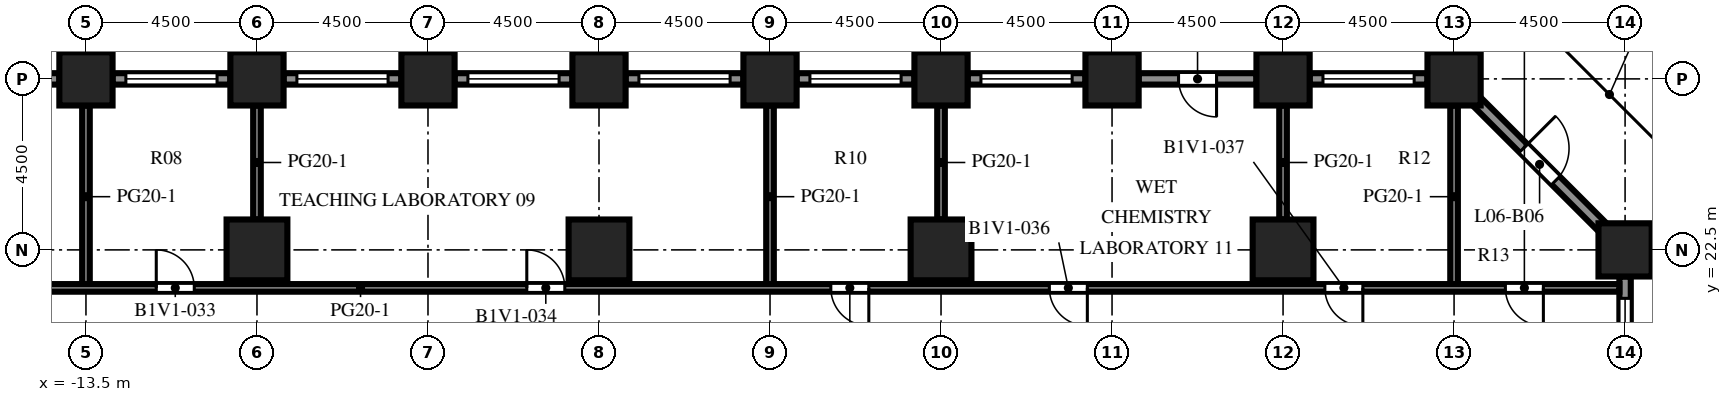
"""IFC4 building model, lengths in metres.
Left out: names, types, materials, properties, quantities, classifications, styles, units other than length and angle.
Written with IfcOpenShell. Run it as: python <this file> out.ifc"""

import sys

from ifc_helpers import new_model, si_unit, direction, frame, frame_2d, origin, origin_2d, place, context, subcontext, project, spatial, rectangle, extrude, element, fill, save


model = new_model("IFC4")
c1 = context("Model", 3, precision=1e-05, world=origin(), true_north=direction((0.0, 1.0)))
c2 = subcontext(c1, "Body", "Model", "MODEL_VIEW")
j1 = project(units=[si_unit("LENGTHUNIT", "METRE"), si_unit("PLANEANGLEUNIT", "RADIAN")], contexts=[c1])
p1 = place(None, origin())
s1 = spatial("IfcSite", under=j1, at=p1, CompositionType="ELEMENT")
p2 = place(p1, origin())
s2 = spatial("IfcBuilding", under=s1, at=p2, CompositionType="ELEMENT")
p3 = place(p2, frame((0.0, 0.0, 27.7)))
s3 = spatial("IfcBuildingStorey", under=s2, at=p3, CompositionType="ELEMENT", Elevation=27.7)
for number, where, z_axis, x_axis in (
    (1, (-13.5, 27.0, 0.0), (0.0, 0.0, 1.0), (1.0, 0.0, 0.0)),
    (2, (-9.0, 27.0, 0.0), (0.0, 0.0, 1.0), (1.0, 0.0, 0.0)),
    (3, (-4.5, 27.0, 0.0), (0.0, 0.0, 1.0), (1.0, 0.0, 0.0)),
    (4, (0.0, 27.0, 0.0), (0.0, 0.0, 1.0), (1.0, 0.0, 0.0)),
    (5, (4.5, 27.0, 0.0), (0.0, 0.0, 1.0), (1.0, 0.0, 0.0)),
    (6, (9.0, 27.0, 0.0), (0.0, 0.0, 1.0), (1.0, 0.0, 0.0)),
    (7, (13.5, 27.0, 0.0), (0.0, 0.0, 1.0), (1.0, 0.0, 0.0)),
    (8, (18.0, 27.0, 0.0), (0.0, 0.0, 1.0), (1.0, 0.0, 0.0)),
    (9, (22.5, 27.0, 0.0), (0.0, 0.0, 1.0), (1.0, 0.0, 0.0)),
    (10, (27.0, 22.5, 0.0), (0.0, 0.0, 1.0), (1.0, 0.0, 0.0)),
):
    element("IfcColumn", number, at=place(p3, frame(where, z_axis=z_axis, x_axis=x_axis)), inside=s3, PredefinedType="COLUMN", context=c2, shape_type="SweptSolid", body=[
        extrude(rectangle(XDim=1.4, YDim=1.4, at=origin_2d()), origin(), (0.0, 0.0, 1.0), 4.1),
    ])
for number, where, z_axis, x_axis in (
    (11, (-9.0, 22.5, 0.0), (0.0, 0.0, 1.0), (1.0, 0.0, 0.0)),
    (12, (0.0, 22.5, 0.0), (0.0, 0.0, 1.0), (1.0, 0.0, 0.0)),
    (13, (9.0, 22.5, 0.0), (0.0, 0.0, 1.0), (1.0, 0.0, 0.0)),
    (14, (18.0, 22.5, 0.0), (0.0, 0.0, 1.0), (1.0, 0.0, 0.0)),
):
    element("IfcColumn", number, at=place(p3, frame(where, z_axis=z_axis, x_axis=x_axis)), inside=s3, PredefinedType="COLUMN", context=c2, shape_type="SweptSolid", body=[
        extrude(rectangle(XDim=1.6, YDim=1.6, at=origin_2d()), origin(), (0.0, 0.0, 1.0), 4.1),
    ])
p4 = place(p3, frame((27.0, 21.8, 0.0), z_axis=(0.0, 0.0, 1.0), x_axis=(0.0, -1.0, 0.0)))
e15 = element("IfcWall", 15, at=p4, inside=s3, PredefinedType="SOLIDWALL", context=c2, shape_type="SweptSolid", body=[
    extrude(rectangle(XDim=3.1, YDim=0.3, at=frame_2d((1.55, 0.0))), origin(), (0.0, 0.0, 1.0), 2.75),
])
p5 = place(p4, frame((0.575, 0.0, 0.8)))
e16 = element("IfcOpeningElement", 16, at=p5, cuts=e15, PredefinedType="OPENING", context=c2, shape_type="SweptSolid", body=[
    extrude(rectangle(XDim=2.4, YDim=1.7, at=frame_2d((1.2, 0.85))), frame((0.0, 0.16, 0.0), z_axis=(0.0, -1.0, 0.0), x_axis=(1.0, 0.0, 0.0)), (0.0, 0.0, 1.0), 0.32),
])
p6 = place(p3, frame((23.094, 26.406, 0.0), z_axis=(0.0, 0.0, 1.0), x_axis=(0.707106781187, -0.707106781187, 0.0)))
e17 = element("IfcWall", 17, at=p6, inside=s3, PredefinedType="SOLIDWALL", context=c2, shape_type="SweptSolid", body=[
    extrude(rectangle(XDim=4.684, YDim=0.3, at=frame_2d((2.342, 0.0))), origin(), (0.0, 0.0, 1.0), 2.75),
])
p7 = place(p6, frame((1.742, 0.0, 0.0)))
e18 = element("IfcOpeningElement", 18, at=p7, cuts=e17, PredefinedType="OPENING", context=c2, shape_type="SweptSolid", body=[
    extrude(rectangle(XDim=1.2, YDim=2.2, at=frame_2d((0.6, 1.1))), frame((0.0, 0.16, 0.0), z_axis=(0.0, -1.0, 0.0), x_axis=(1.0, 0.0, 0.0)), (0.0, 0.0, 1.0), 0.32),
])
p8 = place(p3, frame((18.7, 27.0, 0.0), z_axis=(0.0, 0.0, 1.0), x_axis=(1.0, 0.0, 0.0)))
e19 = element("IfcWall", 19, at=p8, inside=s3, PredefinedType="SOLIDWALL", context=c2, shape_type="SweptSolid", body=[
    extrude(rectangle(XDim=3.1, YDim=0.3, at=frame_2d((1.55, 0.0))), origin(), (0.0, 0.0, 1.0), 2.75),
])
p9 = place(p8, frame((0.35, 0.0, 0.8)))
e20 = element("IfcOpeningElement", 20, at=p9, cuts=e19, PredefinedType="OPENING", context=c2, shape_type="SweptSolid", body=[
    extrude(rectangle(XDim=2.4, YDim=1.7, at=frame_2d((1.2, 0.85))), frame((0.0, 0.16, 0.0), z_axis=(0.0, -1.0, 0.0), x_axis=(1.0, 0.0, 0.0)), (0.0, 0.0, 1.0), 0.32),
])
p10 = place(p3, frame((14.2, 27.0, 0.0), z_axis=(0.0, 0.0, 1.0), x_axis=(1.0, 0.0, 0.0)))
e21 = element("IfcWall", 21, at=p10, inside=s3, PredefinedType="SOLIDWALL", context=c2, shape_type="SweptSolid", body=[
    extrude(rectangle(XDim=3.1, YDim=0.3, at=frame_2d((1.55, 0.0))), origin(), (0.0, 0.0, 1.0), 2.75),
])
p11 = place(p10, frame((1.05, 0.0, 0.0)))
e22 = element("IfcOpeningElement", 22, at=p11, cuts=e21, PredefinedType="OPENING", context=c2, shape_type="SweptSolid", body=[
    extrude(rectangle(XDim=1.0, YDim=2.2, at=frame_2d((0.5, 1.1))), frame((0.0, 0.16, 0.0), z_axis=(0.0, -1.0, 0.0), x_axis=(1.0, 0.0, 0.0)), (0.0, 0.0, 1.0), 0.32),
])
p12 = place(p3, frame((9.7, 27.0, 0.0), z_axis=(0.0, 0.0, 1.0), x_axis=(1.0, 0.0, 0.0)))
e23 = element("IfcWall", 23, at=p12, inside=s3, PredefinedType="SOLIDWALL", context=c2, shape_type="SweptSolid", body=[
    extrude(rectangle(XDim=3.1, YDim=0.3, at=frame_2d((1.55, 0.0))), origin(), (0.0, 0.0, 1.0), 2.75),
])
p13 = place(p12, frame((0.35, 0.0, 0.8)))
e24 = element("IfcOpeningElement", 24, at=p13, cuts=e23, PredefinedType="OPENING", context=c2, shape_type="SweptSolid", body=[
    extrude(rectangle(XDim=2.4, YDim=1.7, at=frame_2d((1.2, 0.85))), frame((0.0, 0.16, 0.0), z_axis=(0.0, -1.0, 0.0), x_axis=(1.0, 0.0, 0.0)), (0.0, 0.0, 1.0), 0.32),
])
p14 = place(p3, frame((5.2, 27.0, 0.0), z_axis=(0.0, 0.0, 1.0), x_axis=(1.0, 0.0, 0.0)))
e25 = element("IfcWall", 25, at=p14, inside=s3, PredefinedType="SOLIDWALL", context=c2, shape_type="SweptSolid", body=[
    extrude(rectangle(XDim=3.1, YDim=0.3, at=frame_2d((1.55, 0.0))), origin(), (0.0, 0.0, 1.0), 2.75),
])
p15 = place(p14, frame((0.35, 0.0, 0.8)))
e26 = element("IfcOpeningElement", 26, at=p15, cuts=e25, PredefinedType="OPENING", context=c2, shape_type="SweptSolid", body=[
    extrude(rectangle(XDim=2.4, YDim=1.7, at=frame_2d((1.2, 0.85))), frame((0.0, 0.16, 0.0), z_axis=(0.0, -1.0, 0.0), x_axis=(1.0, 0.0, 0.0)), (0.0, 0.0, 1.0), 0.32),
])
p16 = place(p3, frame((0.7, 27.0, 0.0), z_axis=(0.0, 0.0, 1.0), x_axis=(1.0, 0.0, 0.0)))
e27 = element("IfcWall", 27, at=p16, inside=s3, PredefinedType="SOLIDWALL", context=c2, shape_type="SweptSolid", body=[
    extrude(rectangle(XDim=3.1, YDim=0.3, at=frame_2d((1.55, 0.0))), origin(), (0.0, 0.0, 1.0), 2.75),
])
p17 = place(p16, frame((0.35, 0.0, 0.8)))
e28 = element("IfcOpeningElement", 28, at=p17, cuts=e27, PredefinedType="OPENING", context=c2, shape_type="SweptSolid", body=[
    extrude(rectangle(XDim=2.4, YDim=1.7, at=frame_2d((1.2, 0.85))), frame((0.0, 0.16, 0.0), z_axis=(0.0, -1.0, 0.0), x_axis=(1.0, 0.0, 0.0)), (0.0, 0.0, 1.0), 0.32),
])
p18 = place(p3, frame((-3.8, 27.0, 0.0), z_axis=(0.0, 0.0, 1.0), x_axis=(1.0, 0.0, 0.0)))
e29 = element("IfcWall", 29, at=p18, inside=s3, PredefinedType="SOLIDWALL", context=c2, shape_type="SweptSolid", body=[
    extrude(rectangle(XDim=3.1, YDim=0.3, at=frame_2d((1.55, 0.0))), origin(), (0.0, 0.0, 1.0), 2.75),
])
p19 = place(p18, frame((0.35, 0.0, 0.8)))
e30 = element("IfcOpeningElement", 30, at=p19, cuts=e29, PredefinedType="OPENING", context=c2, shape_type="SweptSolid", body=[
    extrude(rectangle(XDim=2.4, YDim=1.7, at=frame_2d((1.2, 0.85))), frame((0.0, 0.16, 0.0), z_axis=(0.0, -1.0, 0.0), x_axis=(1.0, 0.0, 0.0)), (0.0, 0.0, 1.0), 0.32),
])
p20 = place(p3, frame((-8.3, 27.0, 0.0), z_axis=(0.0, 0.0, 1.0), x_axis=(1.0, 0.0, 0.0)))
e31 = element("IfcWall", 31, at=p20, inside=s3, PredefinedType="SOLIDWALL", context=c2, shape_type="SweptSolid", body=[
    extrude(rectangle(XDim=3.1, YDim=0.3, at=frame_2d((1.55, 0.0))), origin(), (0.0, 0.0, 1.0), 2.75),
])
p21 = place(p20, frame((0.35, 0.0, 0.8)))
e32 = element("IfcOpeningElement", 32, at=p21, cuts=e31, PredefinedType="OPENING", context=c2, shape_type="SweptSolid", body=[
    extrude(rectangle(XDim=2.4, YDim=1.7, at=frame_2d((1.2, 0.85))), frame((0.0, 0.16, 0.0), z_axis=(0.0, -1.0, 0.0), x_axis=(1.0, 0.0, 0.0)), (0.0, 0.0, 1.0), 0.32),
])
p22 = place(p3, frame((-12.8, 27.0, 0.0), z_axis=(0.0, 0.0, 1.0), x_axis=(1.0, 0.0, 0.0)))
e33 = element("IfcWall", 33, at=p22, inside=s3, PredefinedType="SOLIDWALL", context=c2, shape_type="SweptSolid", body=[
    extrude(rectangle(XDim=3.1, YDim=0.3, at=frame_2d((1.55, 0.0))), origin(), (0.0, 0.0, 1.0), 2.75),
])
p23 = place(p22, frame((0.35, 0.0, 0.8)))
e34 = element("IfcOpeningElement", 34, at=p23, cuts=e33, PredefinedType="OPENING", context=c2, shape_type="SweptSolid", body=[
    extrude(rectangle(XDim=2.4, YDim=1.7, at=frame_2d((1.2, 0.85))), frame((0.0, 0.16, 0.0), z_axis=(0.0, -1.0, 0.0), x_axis=(1.0, 0.0, 0.0)), (0.0, 0.0, 1.0), 0.32),
])
p24 = place(p3, frame((-17.3, 27.0, 0.0), z_axis=(0.0, 0.0, 1.0), x_axis=(1.0, 0.0, 0.0)))
e35 = element("IfcWall", 35, at=p24, inside=s3, PredefinedType="SOLIDWALL", context=c2, shape_type="SweptSolid", body=[
    extrude(rectangle(XDim=3.1, YDim=0.3, at=frame_2d((1.55, 0.0))), origin(), (0.0, 0.0, 1.0), 2.75),
])
p25 = place(p24, frame((1.05, 0.0, 0.0)))
e36 = element("IfcOpeningElement", 36, at=p25, cuts=e35, PredefinedType="OPENING", context=c2, shape_type="SweptSolid", body=[
    extrude(rectangle(XDim=1.0, YDim=2.2, at=frame_2d((0.5, 1.1))), frame((0.0, 0.16, 0.0), z_axis=(0.0, -1.0, 0.0), x_axis=(1.0, 0.0, 0.0)), (0.0, 0.0, 1.0), 0.32),
])
p26 = place(p3, frame((-13.5, 21.5, 0.0), z_axis=(0.0, 0.0, 1.0), x_axis=(0.0, 1.0, 0.0)))
e37 = element("IfcWall", 37, at=p26, inside=s3, PredefinedType="PARTITIONING", context=c2, shape_type="SweptSolid", body=[
    extrude(rectangle(XDim=4.8, YDim=0.2, at=frame_2d((2.4, 0.0))), origin(), (0.0, 0.0, 1.0), 3.65),
])
p27 = place(p3, frame((-9.0, 23.3, 0.0), z_axis=(0.0, 0.0, 1.0), x_axis=(0.0, 1.0, 0.0)))
e38 = element("IfcWall", 38, at=p27, inside=s3, PredefinedType="PARTITIONING", context=c2, shape_type="SweptSolid", body=[
    extrude(rectangle(XDim=3.0, YDim=0.2, at=frame_2d((1.5, 0.0))), origin(), (0.0, 0.0, 1.0), 3.65),
])
p28 = place(p3, frame((4.5, 21.5, 0.0), z_axis=(0.0, 0.0, 1.0), x_axis=(0.0, 1.0, 0.0)))
e39 = element("IfcWall", 39, at=p28, inside=s3, PredefinedType="PARTITIONING", context=c2, shape_type="SweptSolid", body=[
    extrude(rectangle(XDim=4.8, YDim=0.2, at=frame_2d((2.4, 0.0))), origin(), (0.0, 0.0, 1.0), 3.65),
])
for number, where, z_axis, x_axis in (
    (40, (9.0, 23.3, 0.0), (0.0, 0.0, 1.0), (0.0, 1.0, 0.0)),
    (41, (18.0, 23.3, 0.0), (0.0, 0.0, 1.0), (0.0, 1.0, 0.0)),
):
    element("IfcWall", number, at=place(p3, frame(where, z_axis=z_axis, x_axis=x_axis)), inside=s3, PredefinedType="PARTITIONING", context=c2, shape_type="SweptSolid", body=[
        extrude(rectangle(XDim=3.0, YDim=0.2, at=frame_2d((1.5, 0.0))), origin(), (0.0, 0.0, 1.0), 3.65),
    ])
p29 = place(p3, frame((22.5, 21.5, 0.0), z_axis=(0.0, 0.0, 1.0), x_axis=(0.0, 1.0, 0.0)))
e42 = element("IfcWall", 42, at=p29, inside=s3, PredefinedType="PARTITIONING", context=c2, shape_type="SweptSolid", body=[
    extrude(rectangle(XDim=4.8, YDim=0.2, at=frame_2d((2.4, 0.0))), origin(), (0.0, 0.0, 1.0), 3.65),
])
p30 = place(p3, frame((-26.85, 21.5, 0.0), z_axis=(0.0, 0.0, 1.0), x_axis=(1.0, 0.0, 0.0)))
e43 = element("IfcWall", 43, at=p30, inside=s3, PredefinedType="PARTITIONING", context=c2, shape_type="SweptSolid", body=[
    extrude(rectangle(XDim=53.7, YDim=0.2, at=frame_2d((26.85, 0.0))), origin(), (0.0, 0.0, 1.0), 3.65),
])
p31 = place(p30, frame((0.95, 0.0, 0.0)))
e44 = element("IfcOpeningElement", 44, at=p31, cuts=e43, PredefinedType="OPENING", context=c2, shape_type="SweptSolid", body=[
    extrude(rectangle(XDim=1.0, YDim=2.1, at=frame_2d((0.5, 1.05))), frame((0.0, 0.11, 0.0), z_axis=(0.0, -1.0, 0.0), x_axis=(1.0, 0.0, 0.0)), (0.0, 0.0, 1.0), 0.22),
])
p32 = place(p30, frame((9.7, 0.0, 0.0)))
e45 = element("IfcOpeningElement", 45, at=p32, cuts=e43, PredefinedType="OPENING", context=c2, shape_type="SweptSolid", body=[
    extrude(rectangle(XDim=1.0, YDim=2.1, at=frame_2d((0.5, 1.05))), frame((0.0, 0.11, 0.0), z_axis=(0.0, -1.0, 0.0), x_axis=(1.0, 0.0, 0.0)), (0.0, 0.0, 1.0), 0.22),
])
p33 = place(p30, frame((15.2, 0.0, 0.0)))
e46 = element("IfcOpeningElement", 46, at=p33, cuts=e43, PredefinedType="OPENING", context=c2, shape_type="SweptSolid", body=[
    extrude(rectangle(XDim=1.0, YDim=2.1, at=frame_2d((0.5, 1.05))), frame((0.0, 0.11, 0.0), z_axis=(0.0, -1.0, 0.0), x_axis=(1.0, 0.0, 0.0)), (0.0, 0.0, 1.0), 0.22),
])
p34 = place(p30, frame((24.95, 0.0, 0.0)))
e47 = element("IfcOpeningElement", 47, at=p34, cuts=e43, PredefinedType="OPENING", context=c2, shape_type="SweptSolid", body=[
    extrude(rectangle(XDim=1.0, YDim=2.1, at=frame_2d((0.5, 1.05))), frame((0.0, 0.11, 0.0), z_axis=(0.0, -1.0, 0.0), x_axis=(1.0, 0.0, 0.0)), (0.0, 0.0, 1.0), 0.22),
])
p35 = place(p30, frame((32.95, 0.0, 0.0)))
e48 = element("IfcOpeningElement", 48, at=p35, cuts=e43, PredefinedType="OPENING", context=c2, shape_type="SweptSolid", body=[
    extrude(rectangle(XDim=1.0, YDim=2.1, at=frame_2d((0.5, 1.05))), frame((0.0, 0.11, 0.0), z_axis=(0.0, -1.0, 0.0), x_axis=(1.0, 0.0, 0.0)), (0.0, 0.0, 1.0), 0.22),
])
p36 = place(p30, frame((38.7, 0.0, 0.0)))
e49 = element("IfcOpeningElement", 49, at=p36, cuts=e43, PredefinedType="OPENING", context=c2, shape_type="SweptSolid", body=[
    extrude(rectangle(XDim=1.0, YDim=2.1, at=frame_2d((0.5, 1.05))), frame((0.0, 0.11, 0.0), z_axis=(0.0, -1.0, 0.0), x_axis=(1.0, 0.0, 0.0)), (0.0, 0.0, 1.0), 0.22),
])
p37 = place(p30, frame((45.95, 0.0, 0.0)))
e50 = element("IfcOpeningElement", 50, at=p37, cuts=e43, PredefinedType="OPENING", context=c2, shape_type="SweptSolid", body=[
    extrude(rectangle(XDim=1.0, YDim=2.1, at=frame_2d((0.5, 1.05))), frame((0.0, 0.11, 0.0), z_axis=(0.0, -1.0, 0.0), x_axis=(1.0, 0.0, 0.0)), (0.0, 0.0, 1.0), 0.22),
])
p38 = place(p30, frame((50.7, 0.0, 0.0)))
e51 = element("IfcOpeningElement", 51, at=p38, cuts=e43, PredefinedType="OPENING", context=c2, shape_type="SweptSolid", body=[
    extrude(rectangle(XDim=1.0, YDim=2.1, at=frame_2d((0.5, 1.05))), frame((0.0, 0.11, 0.0), z_axis=(0.0, -1.0, 0.0), x_axis=(1.0, 0.0, 0.0)), (0.0, 0.0, 1.0), 0.22),
])
p39 = place(p5, origin())
e52 = element("IfcWindow", 52, at=p39, inside=s3, PartitioningType="SINGLE_PANEL", PredefinedType="WINDOW", context=c2, shape_type="SweptSolid", body=[
    extrude(rectangle(XDim=2.4, YDim=1.7, at=frame_2d((1.2, 0.85))), frame((0.0, 0.03, 0.0), z_axis=(0.0, -1.0, 0.0), x_axis=(1.0, 0.0, 0.0)), (0.0, 0.0, 1.0), 0.06),
])
fill(e16, e52)
p40 = place(p7, origin())
e53 = element("IfcDoor", 53, at=p40, inside=s3, OperationType="SINGLE_SWING_LEFT", PredefinedType="DOOR", context=c2, shape_type="SweptSolid", body=[
    extrude(rectangle(XDim=1.2, YDim=2.2, at=frame_2d((0.6, 1.1))), frame((0.0, 0.025, 0.0), z_axis=(0.0, -1.0, 0.0), x_axis=(1.0, 0.0, 0.0)), (0.0, 0.0, 1.0), 0.05),
])
fill(e18, e53)
p41 = place(p9, origin())
e54 = element("IfcWindow", 54, at=p41, inside=s3, PartitioningType="SINGLE_PANEL", PredefinedType="WINDOW", context=c2, shape_type="SweptSolid", body=[
    extrude(rectangle(XDim=2.4, YDim=1.7, at=frame_2d((1.2, 0.85))), frame((0.0, 0.03, 0.0), z_axis=(0.0, -1.0, 0.0), x_axis=(1.0, 0.0, 0.0)), (0.0, 0.0, 1.0), 0.06),
])
fill(e20, e54)
p42 = place(p11, origin())
e55 = element("IfcDoor", 55, at=p42, inside=s3, OperationType="SINGLE_SWING_RIGHT", PredefinedType="DOOR", context=c2, shape_type="SweptSolid", body=[
    extrude(rectangle(XDim=1.0, YDim=2.2, at=frame_2d((0.5, 1.1))), frame((0.0, 0.025, 0.0), z_axis=(0.0, -1.0, 0.0), x_axis=(1.0, 0.0, 0.0)), (0.0, 0.0, 1.0), 0.05),
])
fill(e22, e55)
p43 = place(p13, origin())
e56 = element("IfcWindow", 56, at=p43, inside=s3, PartitioningType="SINGLE_PANEL", PredefinedType="WINDOW", context=c2, shape_type="SweptSolid", body=[
    extrude(rectangle(XDim=2.4, YDim=1.7, at=frame_2d((1.2, 0.85))), frame((0.0, 0.03, 0.0), z_axis=(0.0, -1.0, 0.0), x_axis=(1.0, 0.0, 0.0)), (0.0, 0.0, 1.0), 0.06),
])
fill(e24, e56)
p44 = place(p15, origin())
e57 = element("IfcWindow", 57, at=p44, inside=s3, PartitioningType="SINGLE_PANEL", PredefinedType="WINDOW", context=c2, shape_type="SweptSolid", body=[
    extrude(rectangle(XDim=2.4, YDim=1.7, at=frame_2d((1.2, 0.85))), frame((0.0, 0.03, 0.0), z_axis=(0.0, -1.0, 0.0), x_axis=(1.0, 0.0, 0.0)), (0.0, 0.0, 1.0), 0.06),
])
fill(e26, e57)
p45 = place(p17, origin())
e58 = element("IfcWindow", 58, at=p45, inside=s3, PartitioningType="SINGLE_PANEL", PredefinedType="WINDOW", context=c2, shape_type="SweptSolid", body=[
    extrude(rectangle(XDim=2.4, YDim=1.7, at=frame_2d((1.2, 0.85))), frame((0.0, 0.03, 0.0), z_axis=(0.0, -1.0, 0.0), x_axis=(1.0, 0.0, 0.0)), (0.0, 0.0, 1.0), 0.06),
])
fill(e28, e58)
p46 = place(p19, origin())
e59 = element("IfcWindow", 59, at=p46, inside=s3, PartitioningType="SINGLE_PANEL", PredefinedType="WINDOW", context=c2, shape_type="SweptSolid", body=[
    extrude(rectangle(XDim=2.4, YDim=1.7, at=frame_2d((1.2, 0.85))), frame((0.0, 0.03, 0.0), z_axis=(0.0, -1.0, 0.0), x_axis=(1.0, 0.0, 0.0)), (0.0, 0.0, 1.0), 0.06),
])
fill(e30, e59)
p47 = place(p21, origin())
e60 = element("IfcWindow", 60, at=p47, inside=s3, PartitioningType="SINGLE_PANEL", PredefinedType="WINDOW", context=c2, shape_type="SweptSolid", body=[
    extrude(rectangle(XDim=2.4, YDim=1.7, at=frame_2d((1.2, 0.85))), frame((0.0, 0.03, 0.0), z_axis=(0.0, -1.0, 0.0), x_axis=(1.0, 0.0, 0.0)), (0.0, 0.0, 1.0), 0.06),
])
fill(e32, e60)
p48 = place(p23, origin())
e61 = element("IfcWindow", 61, at=p48, inside=s3, PartitioningType="SINGLE_PANEL", PredefinedType="WINDOW", context=c2, shape_type="SweptSolid", body=[
    extrude(rectangle(XDim=2.4, YDim=1.7, at=frame_2d((1.2, 0.85))), frame((0.0, 0.03, 0.0), z_axis=(0.0, -1.0, 0.0), x_axis=(1.0, 0.0, 0.0)), (0.0, 0.0, 1.0), 0.06),
])
fill(e34, e61)
p49 = place(p33, origin())
e62 = element("IfcDoor", 62, at=p49, inside=s3, OperationType="SINGLE_SWING_LEFT", PredefinedType="DOOR", context=c2, shape_type="SweptSolid", body=[
    extrude(rectangle(XDim=1.0, YDim=2.1, at=frame_2d((0.5, 1.05))), frame((0.0, 0.025, 0.0), z_axis=(0.0, -1.0, 0.0), x_axis=(1.0, 0.0, 0.0)), (0.0, 0.0, 1.0), 0.05),
])
fill(e46, e62)
p50 = place(p34, origin())
e63 = element("IfcDoor", 63, at=p50, inside=s3, OperationType="SINGLE_SWING_LEFT", PredefinedType="DOOR", context=c2, shape_type="SweptSolid", body=[
    extrude(rectangle(XDim=1.0, YDim=2.1, at=frame_2d((0.5, 1.05))), frame((0.0, 0.025, 0.0), z_axis=(0.0, -1.0, 0.0), x_axis=(1.0, 0.0, 0.0)), (0.0, 0.0, 1.0), 0.05),
])
fill(e47, e63)
p51 = place(p35, origin())
e64 = element("IfcDoor", 64, at=p51, inside=s3, OperationType="SINGLE_SWING_RIGHT", PredefinedType="DOOR", context=c2, shape_type="SweptSolid", body=[
    extrude(rectangle(XDim=1.0, YDim=2.1, at=frame_2d((0.5, 1.05))), frame((0.0, 0.025, 0.0), z_axis=(0.0, -1.0, 0.0), x_axis=(1.0, 0.0, 0.0)), (0.0, 0.0, 1.0), 0.05),
])
fill(e48, e64)
p52 = place(p36, origin())
e65 = element("IfcDoor", 65, at=p52, inside=s3, OperationType="SINGLE_SWING_RIGHT", PredefinedType="DOOR", context=c2, shape_type="SweptSolid", body=[
    extrude(rectangle(XDim=1.0, YDim=2.1, at=frame_2d((0.5, 1.05))), frame((0.0, 0.025, 0.0), z_axis=(0.0, -1.0, 0.0), x_axis=(1.0, 0.0, 0.0)), (0.0, 0.0, 1.0), 0.05),
])
fill(e49, e65)
p53 = place(p37, origin())
e66 = element("IfcDoor", 66, at=p53, inside=s3, OperationType="SINGLE_SWING_RIGHT", PredefinedType="DOOR", context=c2, shape_type="SweptSolid", body=[
    extrude(rectangle(XDim=1.0, YDim=2.1, at=frame_2d((0.5, 1.05))), frame((0.0, 0.025, 0.0), z_axis=(0.0, -1.0, 0.0), x_axis=(1.0, 0.0, 0.0)), (0.0, 0.0, 1.0), 0.05),
])
fill(e50, e66)
p54 = place(p38, origin())
e67 = element("IfcDoor", 67, at=p54, inside=s3, OperationType="SINGLE_SWING_RIGHT", PredefinedType="DOOR", context=c2, shape_type="SweptSolid", body=[
    extrude(rectangle(XDim=1.0, YDim=2.1, at=frame_2d((0.5, 1.05))), frame((0.0, 0.025, 0.0), z_axis=(0.0, -1.0, 0.0), x_axis=(1.0, 0.0, 0.0)), (0.0, 0.0, 1.0), 0.05),
])
fill(e51, e67)
save(model, sys.argv[1])
